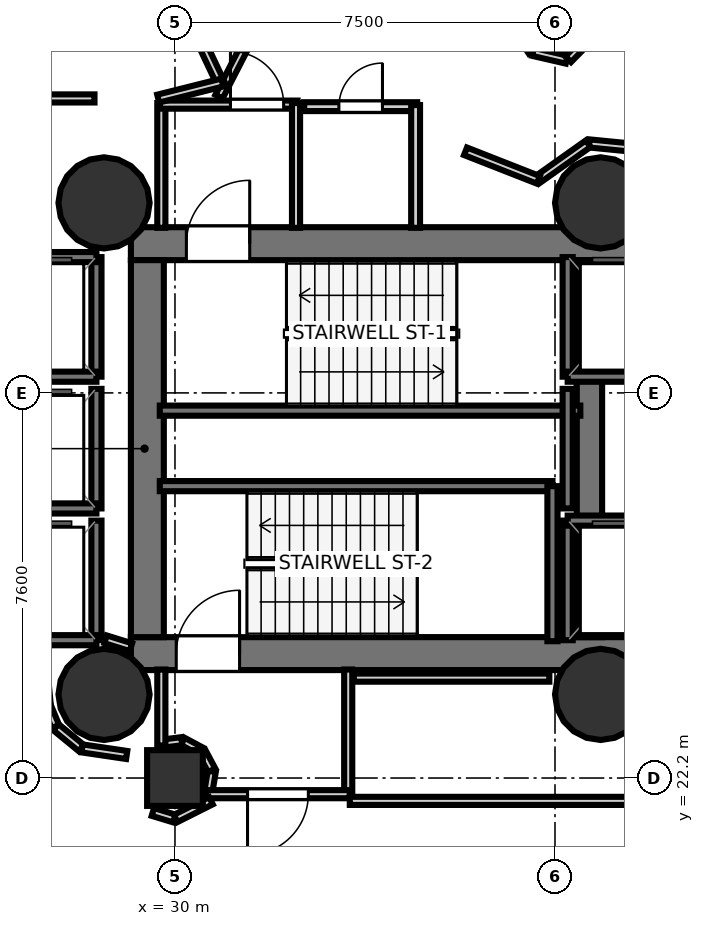
"""IFC4 building model, lengths in metres.
Left out: names, types, materials, properties, quantities, classifications, styles, units other than length and angle.
Written with IfcOpenShell. Run it as: python <this file> out.ifc"""

import sys

from ifc_helpers import new_model, si_unit, direction, frame, frame_2d, origin, origin_2d, place, context, subcontext, project, spatial, rectangle, hollow_circle, extrude, element, fill, save


model = new_model("IFC4")
c1 = context("Model", 3, precision=1e-05, world=origin(), true_north=direction((0.0, 1.0)))
c2 = subcontext(c1, "Body", "Model", "MODEL_VIEW")
j1 = project(units=[si_unit("LENGTHUNIT", "METRE"), si_unit("PLANEANGLEUNIT", "RADIAN")], contexts=[c1])
p1 = place(None, origin())
s1 = spatial("IfcSite", under=j1, at=p1, CompositionType="ELEMENT")
p2 = place(p1, origin())
s2 = spatial("IfcBuilding", under=s1, at=p2, CompositionType="ELEMENT")
p3 = place(p2, frame((0.0, 0.0, -10.0)))
s3 = spatial("IfcBuildingStorey", under=s2, at=p3, CompositionType="ELEMENT", Elevation=-10.0)
p4 = place(p3, frame((29.13, 32.745, 0.0), z_axis=(0.0, 0.0, 1.0), x_axis=(1.0, 0.0, 0.0)))
e1 = element("IfcWall", 1, at=p4, inside=s3, PredefinedType="SHEAR", context=c2, shape_type="SweptSolid", body=[
    extrude(rectangle(XDim=10.72, YDim=0.65, at=frame_2d((5.36, 0.0))), origin(), (0.0, 0.0, 1.0), 4.0),
])
p5 = place(p4, frame((1.095, 0.0, 0.0)))
e2 = element("IfcOpeningElement", 2, at=p5, cuts=e1, PredefinedType="OPENING", context=c2, shape_type="SweptSolid", body=[
    extrude(rectangle(XDim=1.25, YDim=2.15, at=frame_2d((0.625, 1.075))), frame((0.0, 0.335, 0.0), z_axis=(0.0, -1.0, 0.0), x_axis=(1.0, 0.0, 0.0)), (0.0, 0.0, 1.0), 0.67),
])
p6 = place(p3, frame((29.13, 24.655, 0.0), z_axis=(0.0, 0.0, 1.0), x_axis=(1.0, 0.0, 0.0)))
e3 = element("IfcWall", 3, at=p6, inside=s3, PredefinedType="SHEAR", context=c2, shape_type="SweptSolid", body=[
    extrude(rectangle(XDim=10.72, YDim=0.65, at=frame_2d((5.36, 0.0))), origin(), (0.0, 0.0, 1.0), 4.0),
])
p7 = place(p6, frame((0.895, 0.0, 0.0)))
e4 = element("IfcOpeningElement", 4, at=p7, cuts=e3, PredefinedType="OPENING", context=c2, shape_type="SweptSolid", body=[
    extrude(rectangle(XDim=1.25, YDim=2.15, at=frame_2d((0.625, 1.075))), frame((0.0, 0.335, 0.0), z_axis=(0.0, -1.0, 0.0), x_axis=(1.0, 0.0, 0.0)), (0.0, 0.0, 1.0), 0.67),
])
p8 = place(p3, frame((29.455, 24.98, 0.0), z_axis=(0.0, 0.0, 1.0), x_axis=(0.0, 1.0, 0.0)))
e5 = element("IfcWall", 5, at=p8, inside=s3, PredefinedType="SHEAR", context=c2, shape_type="SweptSolid", body=[
    extrude(rectangle(XDim=7.44, YDim=0.65, at=frame_2d((3.72, 0.0))), origin(), (0.0, 0.0, 1.0), 4.0),
])
p9 = place(p3, frame((38.18, 24.98, 0.0), z_axis=(0.0, 0.0, 1.0), x_axis=(0.0, 1.0, 0.0)))
e6 = element("IfcWall", 6, at=p9, inside=s3, PredefinedType="SHEAR", context=c2, shape_type="SweptSolid", body=[
    extrude(rectangle(XDim=7.44, YDim=0.5, at=frame_2d((3.72, 0.0))), origin(), (0.0, 0.0, 1.0), 4.0),
])
for number, where, z_axis, x_axis in (
    (7, (28.6, 33.55, 0.0), (0.0, 0.0, 1.0), (1.0, 0.0, 0.0)),
    (8, (28.6, 23.85, 0.0), (0.0, 0.0, 1.0), (1.0, 0.0, 0.0)),
    (9, (38.4, 33.55, 0.0), (0.0, 0.0, 1.0), (1.0, 0.0, 0.0)),
    (10, (38.4, 23.85, 0.0), (0.0, 0.0, 1.0), (1.0, 0.0, 0.0)),
):
    element("IfcColumn", number, at=place(p3, frame(where, z_axis=z_axis, x_axis=x_axis)), inside=s3, PredefinedType="COLUMN", context=c2, shape_type="SweptSolid", body=[
        extrude(hollow_circle(Radius=0.9, WallThickness=0.045, at=origin_2d()), origin(), (0.0, 0.0, 1.0), 4.4),
    ])
p10 = place(p3, frame((30.0, 22.2, 0.0), z_axis=(0.0, 0.0, 1.0), x_axis=(1.0, 0.0, 0.0)))
e11 = element("IfcColumn", 11, at=p10, inside=s3, PredefinedType="COLUMN", context=c2, shape_type="SweptSolid", body=[
    extrude(rectangle(XDim=1.1, YDim=1.1, at=origin_2d()), origin(), (0.0, 0.0, 1.0), 4.4),
])
p11 = place(p3, frame((29.7, 29.45, 0.0), z_axis=(0.0, 0.0, 1.0), x_axis=(1.0, 0.0, 0.0)))
e12 = element("IfcWall", 12, at=p11, inside=s3, PredefinedType="SOLIDWALL", context=c2, shape_type="SweptSolid", body=[
    extrude(rectangle(XDim=8.3, YDim=0.2, at=frame_2d((4.15, 0.0))), origin(), (0.0, 0.0, 1.0), 4.0),
])
p12 = place(p3, frame((29.7, 27.96, 0.0), z_axis=(0.0, 0.0, 1.0), x_axis=(1.0, 0.0, 0.0)))
e13 = element("IfcWall", 13, at=p12, inside=s3, PredefinedType="SOLIDWALL", context=c2, shape_type="SweptSolid", body=[
    extrude(rectangle(XDim=7.75, YDim=0.2, at=frame_2d((3.875, 0.0))), origin(), (0.0, 0.0, 1.0), 4.0),
])
p13 = place(p3, frame((37.45, 24.9, 0.0), z_axis=(0.0, 0.0, 1.0), x_axis=(0.0, 1.0, 0.0)))
e14 = element("IfcWall", 14, at=p13, inside=s3, PredefinedType="SOLIDWALL", context=c2, shape_type="SweptSolid", body=[
    extrude(rectangle(XDim=3.06, YDim=0.2, at=frame_2d((1.53, 0.0))), origin(), (0.0, 0.0, 1.0), 4.0),
])
p14 = place(p3, frame((37.75, 30.12, 0.0), z_axis=(0.0, 0.0, 1.0), x_axis=(0.0, 1.0, 0.0)))
e15 = element("IfcWall", 15, at=p14, inside=s3, PredefinedType="SOLIDWALL", context=c2, shape_type="SweptSolid", body=[
    extrude(rectangle(XDim=2.36, YDim=0.2, at=frame_2d((1.18, 0.0))), origin(), (0.0, 0.0, 1.0), 4.0),
])
p15 = place(p3, frame((37.75, 30.12, 0.0), z_axis=(0.0, 0.0, 1.0), x_axis=(1.0, 0.0, 0.0)))
e16 = element("IfcWall", 16, at=p15, inside=s3, PredefinedType="SOLIDWALL", context=c2, shape_type="SweptSolid", body=[
    extrude(rectangle(XDim=2.1, YDim=0.2, at=frame_2d((1.05, 0.0))), origin(), (0.0, 0.0, 1.0), 4.0),
])
p16 = place(p3, frame((37.75, 24.92, 0.0), z_axis=(0.0, 0.0, 1.0), x_axis=(0.0, 1.0, 0.0)))
e17 = element("IfcWall", 17, at=p16, inside=s3, PredefinedType="SOLIDWALL", context=c2, shape_type="SweptSolid", body=[
    extrude(rectangle(XDim=2.36, YDim=0.2, at=frame_2d((1.18, 0.0))), origin(), (0.0, 0.0, 1.0), 4.0),
])
p17 = place(p3, frame((37.75, 27.28, 0.0), z_axis=(0.0, 0.0, 1.0), x_axis=(1.0, 0.0, 0.0)))
e18 = element("IfcWall", 18, at=p17, inside=s3, PredefinedType="SOLIDWALL", context=c2, shape_type="SweptSolid", body=[
    extrude(rectangle(XDim=2.1, YDim=0.2, at=frame_2d((1.05, 0.0))), origin(), (0.0, 0.0, 1.0), 4.0),
])
p18 = place(p3, frame((28.45, 30.12, 0.0), z_axis=(0.0, 0.0, 1.0), x_axis=(0.0, 1.0, 0.0)))
e19 = element("IfcWall", 19, at=p18, inside=s3, PredefinedType="SOLIDWALL", context=c2, shape_type="SweptSolid", body=[
    extrude(rectangle(XDim=2.36, YDim=0.2, at=frame_2d((1.18, 0.0))), origin(), (0.0, 0.0, 1.0), 4.0),
])
for number, where, z_axis, x_axis in (
    (20, (26.35, 32.48, 0.0), (0.0, 0.0, 1.0), (1.0, 0.0, 0.0)),
    (21, (26.35, 30.12, 0.0), (0.0, 0.0, 1.0), (1.0, 0.0, 0.0)),
):
    element("IfcWall", number, at=place(p3, frame(where, z_axis=z_axis, x_axis=x_axis)), inside=s3, PredefinedType="SOLIDWALL", context=c2, shape_type="SweptSolid", body=[
        extrude(rectangle(XDim=2.1, YDim=0.2, at=frame_2d((1.05, 0.0))), origin(), (0.0, 0.0, 1.0), 4.0),
    ])
p19 = place(p3, frame((28.45, 27.52, 0.0), z_axis=(0.0, 0.0, 1.0), x_axis=(0.0, 1.0, 0.0)))
e22 = element("IfcWall", 22, at=p19, inside=s3, PredefinedType="SOLIDWALL", context=c2, shape_type="SweptSolid", body=[
    extrude(rectangle(XDim=2.36, YDim=0.2, at=frame_2d((1.18, 0.0))), origin(), (0.0, 0.0, 1.0), 4.0),
])
p20 = place(p3, frame((26.35, 27.52, 0.0), z_axis=(0.0, 0.0, 1.0), x_axis=(1.0, 0.0, 0.0)))
e23 = element("IfcWall", 23, at=p20, inside=s3, PredefinedType="SOLIDWALL", context=c2, shape_type="SweptSolid", body=[
    extrude(rectangle(XDim=2.1, YDim=0.2, at=frame_2d((1.05, 0.0))), origin(), (0.0, 0.0, 1.0), 4.0),
])
p21 = place(p3, frame((28.45, 24.92, 0.0), z_axis=(0.0, 0.0, 1.0), x_axis=(0.0, 1.0, 0.0)))
e24 = element("IfcWall", 24, at=p21, inside=s3, PredefinedType="SOLIDWALL", context=c2, shape_type="SweptSolid", body=[
    extrude(rectangle(XDim=2.36, YDim=0.2, at=frame_2d((1.18, 0.0))), origin(), (0.0, 0.0, 1.0), 4.0),
])
p22 = place(p3, frame((26.35, 24.92, 0.0), z_axis=(0.0, 0.0, 1.0), x_axis=(1.0, 0.0, 0.0)))
e25 = element("IfcWall", 25, at=p22, inside=s3, PredefinedType="SOLIDWALL", context=c2, shape_type="SweptSolid", body=[
    extrude(rectangle(XDim=2.1, YDim=0.2, at=frame_2d((1.05, 0.0))), origin(), (0.0, 0.0, 1.0), 4.0),
])
p23 = place(p3, frame((37.75, 27.52, 0.0), z_axis=(0.0, 0.0, 1.0), x_axis=(0.0, 1.0, 0.0)))
e26 = element("IfcWall", 26, at=p23, inside=s3, PredefinedType="SOLIDWALL", context=c2, shape_type="SweptSolid", body=[
    extrude(rectangle(XDim=2.36, YDim=0.2, at=frame_2d((1.18, 0.0))), origin(), (0.0, 0.0, 1.0), 4.0),
])
p24 = place(p3, frame((29.731, 33.058, 0.0), z_axis=(0.0, 0.0, 1.0), x_axis=(0.0, 1.0, 0.0)))
e27 = element("IfcWall", 27, at=p24, inside=s3, PredefinedType="PARTITIONING", context=c2, shape_type="SweptSolid", body=[
    extrude(rectangle(XDim=2.462, YDim=0.16, at=frame_2d((1.231, 0.0))), origin(), (0.0, 0.0, 1.0), 3.078),
])
p25 = place(p3, frame((29.7, 35.489, 0.0), z_axis=(0.0, 0.0, 1.0), x_axis=(1.0, 0.0, 0.0)))
e28 = element("IfcWall", 28, at=p25, inside=s3, PredefinedType="PARTITIONING", context=c2, shape_type="SweptSolid", body=[
    extrude(rectangle(XDim=2.72, YDim=0.16, at=frame_2d((1.36, 0.0))), origin(), (0.0, 0.0, 1.0), 3.32),
])
p26 = place(p25, frame((1.395, 0.0, 0.0)))
e29 = element("IfcOpeningElement", 29, at=p26, cuts=e28, PredefinedType="OPENING", context=c2, shape_type="SweptSolid", body=[
    extrude(rectangle(XDim=1.05, YDim=2.15, at=frame_2d((0.525, 1.075))), frame((0.0, 0.09, 0.0), z_axis=(0.0, -1.0, 0.0), x_axis=(1.0, 0.0, 0.0)), (0.0, 0.0, 1.0), 0.18),
])
p27 = place(p3, frame((32.389, 35.52, 0.0), z_axis=(0.0, 0.0, 1.0), x_axis=(0.0, -1.0, 0.0)))
e30 = element("IfcWall", 30, at=p27, inside=s3, PredefinedType="PARTITIONING", context=c2, shape_type="SweptSolid", body=[
    extrude(rectangle(XDim=2.462, YDim=0.16, at=frame_2d((1.231, 0.0))), origin(), (0.0, 0.0, 1.0), 3.078),
])
p28 = place(p3, frame((30.645, 21.845, 0.0), z_axis=(0.0, 0.0, 1.0), x_axis=(0.16559769087, 0.986193391165, 0.0)))
e31 = element("IfcWall", 31, at=p28, inside=s3, PredefinedType="PARTITIONING", context=c2, shape_type="SweptSolid", body=[
    extrude(rectangle(XDim=0.495, YDim=0.16, at=frame_2d((0.248, 0.0))), origin(), (0.0, 0.0, 1.0), 3.178),
])
p29 = place(p3, frame((30.724, 22.353, 0.0), z_axis=(0.0, 0.0, 1.0), x_axis=(-0.471202615726, 0.882024996773, 0.0)))
e32 = element("IfcWall", 32, at=p29, inside=s3, PredefinedType="PARTITIONING", context=c2, shape_type="SweptSolid", body=[
    extrude(rectangle(XDim=0.412, YDim=0.16, at=frame_2d((0.206, 0.0))), origin(), (0.0, 0.0, 1.0), 3.178),
])
p30 = place(p3, frame((30.517, 22.729, 0.0), z_axis=(0.0, 0.0, 1.0), x_axis=(-0.882139655073, 0.470987928665, 0.0)))
e33 = element("IfcWall", 33, at=p30, inside=s3, PredefinedType="PARTITIONING", context=c2, shape_type="SweptSolid", body=[
    extrude(rectangle(XDim=0.412, YDim=0.16, at=frame_2d((0.206, 0.0))), origin(), (0.0, 0.0, 1.0), 3.32),
])
p31 = place(p3, frame((30.135, 22.927, 0.0), z_axis=(0.0, 0.0, 1.0), x_axis=(-0.992106976416, -0.125394367286, 0.0)))
e34 = element("IfcWall", 34, at=p31, inside=s3, PredefinedType="PARTITIONING", context=c2, shape_type="SweptSolid", body=[
    extrude(rectangle(XDim=0.442, YDim=0.16, at=frame_2d((0.221, 0.0))), origin(), (0.0, 0.0, 1.0), 3.32),
])
p32 = place(p3, frame((29.731, 22.841, 0.0), z_axis=(0.0, 0.0, 1.0), x_axis=(0.0, 1.0, 0.0)))
e35 = element("IfcWall", 35, at=p32, inside=s3, PredefinedType="PARTITIONING", context=c2, shape_type="SweptSolid", body=[
    extrude(rectangle(XDim=1.501, YDim=0.16, at=frame_2d((0.75, 0.0))), origin(), (0.0, 0.0, 1.0), 3.078),
])
p33 = place(p3, frame((33.419, 24.342, 0.0), z_axis=(0.0, 0.0, 1.0), x_axis=(0.0, -1.0, 0.0)))
e36 = element("IfcWall", 36, at=p33, inside=s3, PredefinedType="PARTITIONING", context=c2, shape_type="SweptSolid", body=[
    extrude(rectangle(XDim=2.492, YDim=0.16, at=frame_2d((1.246, 0.0))), origin(), (0.0, 0.0, 1.0), 3.078),
])
p34 = place(p3, frame((33.45, 21.881, 0.0), z_axis=(0.0, 0.0, 1.0), x_axis=(-1.0, 0.0, 0.0)))
e37 = element("IfcWall", 37, at=p34, inside=s3, PredefinedType="PARTITIONING", context=c2, shape_type="SweptSolid", body=[
    extrude(rectangle(XDim=2.836, YDim=0.16, at=frame_2d((1.418, 0.0))), origin(), (0.0, 0.0, 1.0), 3.32),
])
p35 = place(p34, frame((0.818, 0.0, 0.0)))
e38 = element("IfcOpeningElement", 38, at=p35, cuts=e37, PredefinedType="OPENING", context=c2, shape_type="SweptSolid", body=[
    extrude(rectangle(XDim=1.2, YDim=2.15, at=frame_2d((0.6, 1.075))), frame((0.0, 0.09, 0.0), z_axis=(0.0, -1.0, 0.0), x_axis=(1.0, 0.0, 0.0)), (0.0, 0.0, 1.0), 0.18),
])
p36 = place(p3, frame((32.55, 35.449, 0.0), z_axis=(0.0, 0.0, 1.0), x_axis=(1.0, 0.0, 0.0)))
e39 = element("IfcWall", 39, at=p36, inside=s3, PredefinedType="PLUMBINGWALL", context=c2, shape_type="SweptSolid", body=[
    extrude(rectangle(XDim=2.23, YDim=0.175, at=frame_2d((1.115, 0.0))), origin(), (0.0, 0.0, 1.0), 3.32),
])
p37 = place(p36, frame((0.685, 0.0, 0.0)))
e40 = element("IfcOpeningElement", 40, at=p37, cuts=e39, PredefinedType="OPENING", context=c2, shape_type="SweptSolid", body=[
    extrude(rectangle(XDim=0.86, YDim=2.05, at=frame_2d((0.43, 1.025))), frame((0.0, 0.097, 0.0), z_axis=(0.0, -1.0, 0.0), x_axis=(1.0, 0.0, 0.0)), (0.0, 0.0, 1.0), 0.195),
])
p38 = place(p3, frame((34.749, 35.48, 0.0), z_axis=(0.0, 0.0, 1.0), x_axis=(0.0, -1.0, 0.0)))
e41 = element("IfcWall", 41, at=p38, inside=s3, PredefinedType="PLUMBINGWALL", context=c2, shape_type="SweptSolid", body=[
    extrude(rectangle(XDim=2.422, YDim=0.175, at=frame_2d((1.211, 0.0))), origin(), (0.0, 0.0, 1.0), 3.078),
])
p39 = place(p3, frame((29.13, 24.782, 0.0), z_axis=(0.0, 0.0, 1.0), x_axis=(-0.955000482512, 0.296604245422, 0.0)))
e42 = element("IfcWall", 42, at=p39, inside=s3, PredefinedType="PARTITIONING", context=c2, shape_type="SweptSolid", body=[
    extrude(rectangle(XDim=0.524, YDim=0.16, at=frame_2d((0.262, 0.0))), origin(), (0.0, 0.0, 1.0), 3.32),
])
p40 = place(p3, frame((37.389, 24.181, 0.0), z_axis=(0.0, 0.0, 1.0), x_axis=(-1.0, 0.0, 0.0)))
e43 = element("IfcWall", 43, at=p40, inside=s3, PredefinedType="PARTITIONING", context=c2, shape_type="SweptSolid", body=[
    extrude(rectangle(XDim=3.859, YDim=0.16, at=frame_2d((1.929, 0.0))), origin(), (0.0, 0.0, 1.0), 3.078),
])
p41 = place(p3, frame((36.719, 37.033, 0.0), z_axis=(0.0, 0.0, 1.0), x_axis=(0.555369021078, -0.831604022613, 0.0)))
e44 = element("IfcWall", 44, at=p41, inside=s3, PredefinedType="PARTITIONING", context=c2, shape_type="SweptSolid", body=[
    extrude(rectangle(XDim=0.59, YDim=0.16, at=frame_2d((0.295, 0.0))), origin(), (0.0, 0.0, 1.0), 3.32),
])
p42 = place(p3, frame((37.065, 36.53, 0.0), z_axis=(0.0, 0.0, 1.0), x_axis=(0.974571578147, -0.224076413457, 0.0)))
e45 = element("IfcWall", 45, at=p42, inside=s3, PredefinedType="PARTITIONING", context=c2, shape_type="SweptSolid", body=[
    extrude(rectangle(XDim=0.683, YDim=0.16, at=frame_2d((0.342, 0.0))), origin(), (0.0, 0.0, 1.0), 3.32),
])
p43 = place(p3, frame((37.76, 36.385, 0.0), z_axis=(0.0, 0.0, 1.0), x_axis=(0.700866130058, 0.713292834492, 0.0)))
e46 = element("IfcWall", 46, at=p43, inside=s3, PredefinedType="PARTITIONING", context=c2, shape_type="SweptSolid", body=[
    extrude(rectangle(XDim=0.884, YDim=0.16, at=frame_2d((0.442, 0.0))), origin(), (0.0, 0.0, 1.0), 3.32),
])
p44 = place(p3, frame((39.676, 34.575, 0.0), z_axis=(0.0, 0.0, 1.0), x_axis=(-0.995186799139, 0.097996095944, 0.0)))
e47 = element("IfcWall", 47, at=p44, inside=s3, PredefinedType="PARTITIONING", context=c2, shape_type="SweptSolid", body=[
    extrude(rectangle(XDim=1.507, YDim=0.16, at=frame_2d((0.754, 0.0))), origin(), (0.0, 0.0, 1.0), 3.32),
])
p45 = place(p3, frame((38.155, 34.718, 0.0), z_axis=(0.0, 0.0, 1.0), x_axis=(-0.815749774427, -0.578404966717, 0.0)))
e48 = element("IfcWall", 48, at=p45, inside=s3, PredefinedType="PARTITIONING", context=c2, shape_type="SweptSolid", body=[
    extrude(rectangle(XDim=1.24, YDim=0.16, at=frame_2d((0.62, 0.0))), origin(), (0.0, 0.0, 1.0), 3.32),
])
p46 = place(p3, frame((37.172, 34.004, 0.0), z_axis=(0.0, 0.0, 1.0), x_axis=(-0.930972145639, 0.36509021357, 0.0)))
e49 = element("IfcWall", 49, at=p46, inside=s3, PredefinedType="PARTITIONING", context=c2, shape_type="SweptSolid", body=[
    extrude(rectangle(XDim=1.545, YDim=0.16, at=frame_2d((0.773, 0.0))), origin(), (0.0, 0.0, 1.0), 3.078),
])
p47 = place(p3, frame((30.868, 35.646, 0.0), z_axis=(0.0, 0.0, 1.0), x_axis=(0.457713605207, 0.889099688229, 0.0)))
e50 = element("IfcWall", 50, at=p47, inside=s3, PredefinedType="PARTITIONING", context=c2, shape_type="SweptSolid", body=[
    extrude(rectangle(XDim=1.901, YDim=0.16, at=frame_2d((0.951, 0.0))), origin(), (0.0, 0.0, 1.0), 3.32),
])
p48 = place(p3, frame((30.157, 37.487, 0.0), z_axis=(0.0, 0.0, 1.0), x_axis=(0.427353044203, -0.904084827663, 0.0)))
e51 = element("IfcWall", 51, at=p48, inside=s3, PredefinedType="PARTITIONING", context=c2, shape_type="SweptSolid", body=[
    extrude(rectangle(XDim=1.775, YDim=0.16, at=frame_2d((0.887, 0.0))), origin(), (0.0, 0.0, 1.0), 3.32),
])
p49 = place(p3, frame((30.937, 35.926, 0.0), z_axis=(0.0, 0.0, 1.0), x_axis=(-0.969933389944, -0.243370538628, 0.0)))
e52 = element("IfcWall", 52, at=p49, inside=s3, PredefinedType="PARTITIONING", context=c2, shape_type="SweptSolid", body=[
    extrude(rectangle(XDim=1.307, YDim=0.16, at=frame_2d((0.654, 0.0))), origin(), (0.0, 0.0, 1.0), 3.32),
])
p50 = place(p3, frame((28.411, 35.611, 0.0), z_axis=(0.0, 0.0, 1.0), x_axis=(-1.0, 0.0, 0.0)))
e53 = element("IfcWall", 53, at=p50, inside=s3, PredefinedType="PARTITIONING", context=c2, shape_type="SweptSolid", body=[
    extrude(rectangle(XDim=1.861, YDim=0.16, at=frame_2d((0.931, 0.0))), origin(), (0.0, 0.0, 1.0), 3.32),
])
p51 = place(p3, frame((27.473, 23.62, 0.0), z_axis=(0.0, 0.0, 1.0), x_axis=(0.382631351728, -0.923901103298, 0.0)))
e54 = element("IfcWall", 54, at=p51, inside=s3, PredefinedType="PARTITIONING", context=c2, shape_type="SweptSolid", body=[
    extrude(rectangle(XDim=0.437, YDim=0.16, at=frame_2d((0.219, 0.0))), origin(), (0.0, 0.0, 1.0), 3.32),
])
p52 = place(p3, frame((27.649, 23.204, 0.0), z_axis=(0.0, 0.0, 1.0), x_axis=(0.772818338666, -0.634627304346, 0.0)))
e55 = element("IfcWall", 55, at=p52, inside=s3, PredefinedType="PARTITIONING", context=c2, shape_type="SweptSolid", body=[
    extrude(rectangle(XDim=0.65, YDim=0.16, at=frame_2d((0.325, 0.0))), origin(), (0.0, 0.0, 1.0), 3.32),
])
p53 = place(p3, frame((28.167, 22.785, 0.0), z_axis=(0.0, 0.0, 1.0), x_axis=(0.989291662385, -0.145952069991, 0.0)))
e56 = element("IfcWall", 56, at=p53, inside=s3, PredefinedType="PARTITIONING", context=c2, shape_type="SweptSolid", body=[
    extrude(rectangle(XDim=0.89, YDim=0.16, at=frame_2d((0.445, 0.0))), origin(), (0.0, 0.0, 1.0), 3.32),
])
p54 = place(p3, frame((29.563, 21.53, 0.0), z_axis=(0.0, 0.0, 1.0), x_axis=(0.957010621041, -0.290052876583, 0.0)))
e57 = element("IfcWall", 57, at=p54, inside=s3, PredefinedType="PARTITIONING", context=c2, shape_type="SweptSolid", body=[
    extrude(rectangle(XDim=0.447, YDim=0.16, at=frame_2d((0.224, 0.0))), origin(), (0.0, 0.0, 1.0), 3.32),
])
p55 = place(p3, frame((30.014, 21.402, 0.0), z_axis=(0.0, 0.0, 1.0), x_axis=(0.893548213857, 0.448967247706, 0.0)))
e58 = element("IfcWall", 58, at=p55, inside=s3, PredefinedType="PARTITIONING", context=c2, shape_type="SweptSolid", body=[
    extrude(rectangle(XDim=0.779, YDim=0.16, at=frame_2d((0.39, 0.0))), origin(), (0.0, 0.0, 1.0), 3.32),
])
p56 = place(p3, frame((33.45, 21.749, 0.0), z_axis=(0.0, 0.0, 1.0), x_axis=(1.0, 0.0, 0.0)))
e59 = element("IfcWall", 59, at=p56, inside=s3, PredefinedType="PARTITIONING", context=c2, shape_type="SweptSolid", body=[
    extrude(rectangle(XDim=6.43, YDim=0.16, at=frame_2d((3.215, 0.0))), origin(), (0.0, 0.0, 1.0), 3.32),
])
p57 = place(p5, origin())
e60 = element("IfcDoor", 60, at=p57, inside=s3, OperationType="SINGLE_SWING_RIGHT", PredefinedType="DOOR", context=c2, shape_type="SweptSolid", body=[
    extrude(rectangle(XDim=1.25, YDim=2.15, at=frame_2d((0.625, 1.075))), frame((0.0, 0.025, 0.0), z_axis=(0.0, -1.0, 0.0), x_axis=(1.0, 0.0, 0.0)), (0.0, 0.0, 1.0), 0.05),
])
fill(e2, e60)
p58 = place(p7, origin())
e61 = element("IfcDoor", 61, at=p58, inside=s3, OperationType="SINGLE_SWING_RIGHT", PredefinedType="DOOR", context=c2, shape_type="SweptSolid", body=[
    extrude(rectangle(XDim=1.25, YDim=2.15, at=frame_2d((0.625, 1.075))), frame((0.0, 0.025, 0.0), z_axis=(0.0, -1.0, 0.0), x_axis=(1.0, 0.0, 0.0)), (0.0, 0.0, 1.0), 0.05),
])
fill(e4, e61)
p59 = place(p26, origin())
e62 = element("IfcDoor", 62, at=p59, inside=s3, OperationType="SINGLE_SWING_LEFT", PredefinedType="DOOR", context=c2, shape_type="SweptSolid", body=[
    extrude(rectangle(XDim=1.05, YDim=2.15, at=frame_2d((0.525, 1.075))), frame((0.0, 0.025, 0.0), z_axis=(0.0, -1.0, 0.0), x_axis=(1.0, 0.0, 0.0)), (0.0, 0.0, 1.0), 0.05),
])
fill(e29, e62)
p60 = place(p35, origin())
e63 = element("IfcDoor", 63, at=p60, inside=s3, OperationType="SINGLE_SWING_RIGHT", PredefinedType="DOOR", context=c2, shape_type="SweptSolid", body=[
    extrude(rectangle(XDim=1.2, YDim=2.15, at=frame_2d((0.6, 1.075))), frame((0.0, 0.025, 0.0), z_axis=(0.0, -1.0, 0.0), x_axis=(1.0, 0.0, 0.0)), (0.0, 0.0, 1.0), 0.05),
])
fill(e38, e63)
p61 = place(p37, origin())
e64 = element("IfcDoor", 64, at=p61, inside=s3, OperationType="SINGLE_SWING_RIGHT", PredefinedType="DOOR", context=c2, shape_type="SweptSolid", body=[
    extrude(rectangle(XDim=0.86, YDim=2.05, at=frame_2d((0.43, 1.025))), frame((0.0, 0.025, 0.0), z_axis=(0.0, -1.0, 0.0), x_axis=(1.0, 0.0, 0.0)), (0.0, 0.0, 1.0), 0.05),
])
fill(e40, e64)
save(model, sys.argv[1])
